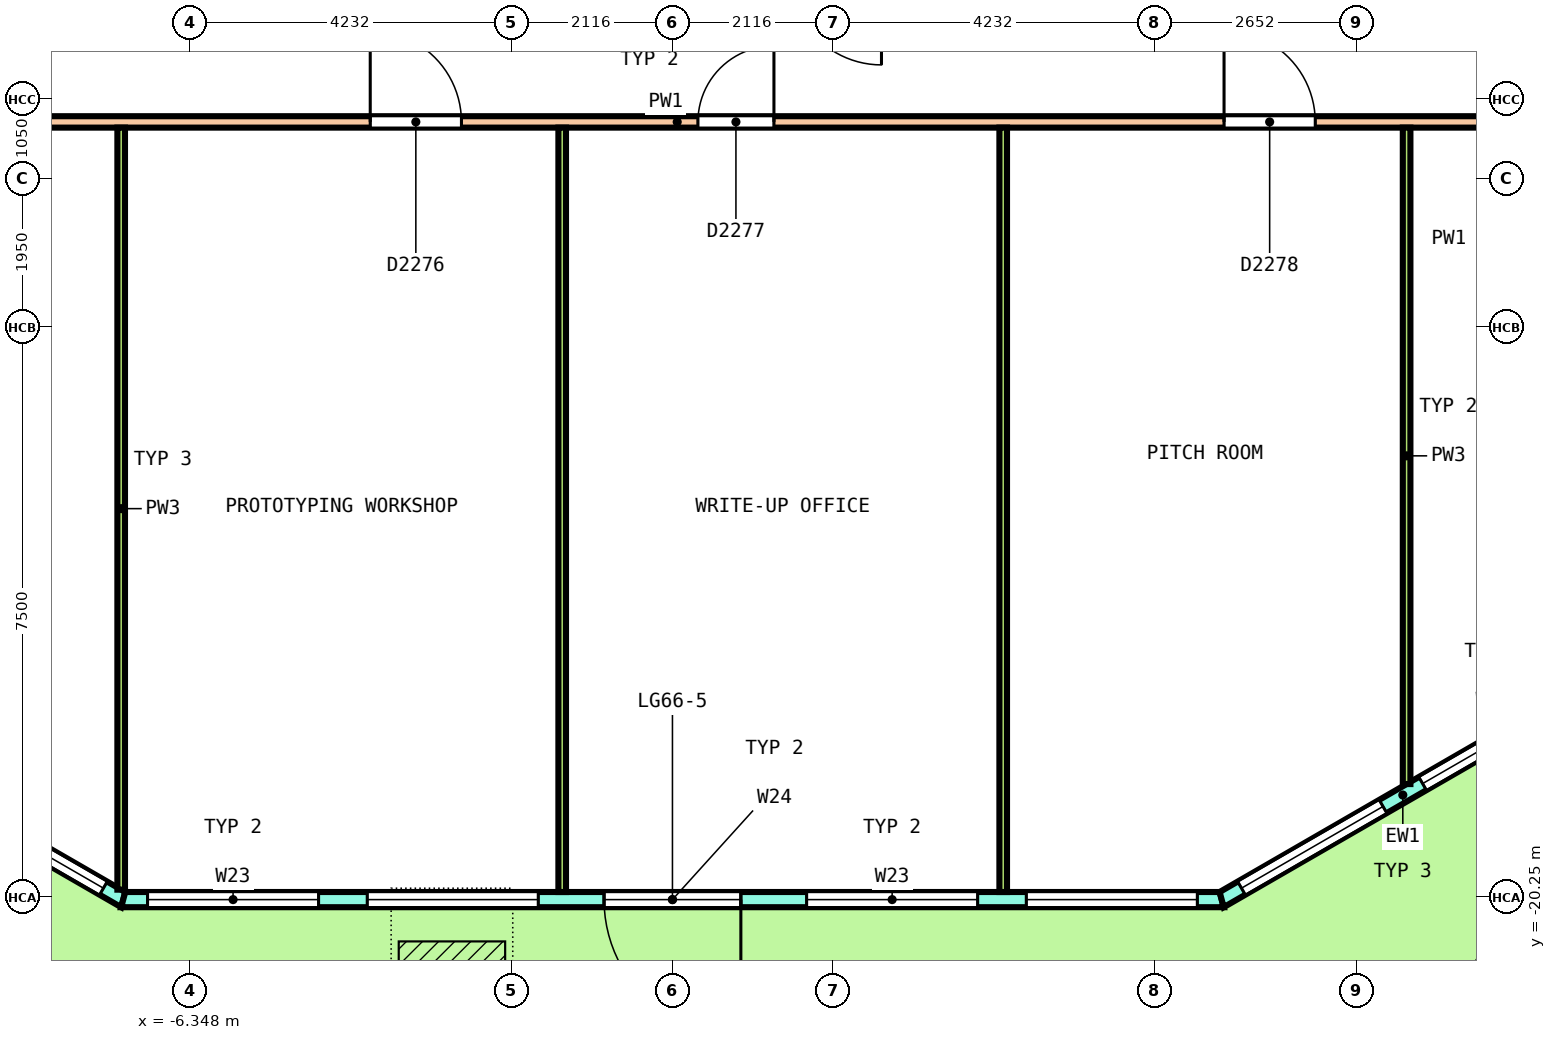
"""IFC4 building model, lengths in metres.
Left out: names, types, materials, properties, quantities, classifications, styles, units other than length and angle.
Written with IfcOpenShell. Run it as: python <this file> out.ifc"""

import sys

from ifc_helpers import new_model, si_unit, direction, frame, frame_2d, origin, origin_2d, place, context, subcontext, project, spatial, polyline, rectangle, outline, extrude, element, fill, save


model = new_model("IFC4")
c1 = context("Model", 3, precision=1e-05, world=origin(), true_north=direction((0.0, 1.0)))
c2 = subcontext(c1, "Body", "Model", "MODEL_VIEW")
j1 = project(units=[si_unit("LENGTHUNIT", "METRE"), si_unit("PLANEANGLEUNIT", "RADIAN")], contexts=[c1])
p1 = place(None, origin())
s1 = spatial("IfcSite", under=j1, at=p1, CompositionType="ELEMENT")
p2 = place(p1, origin())
s2 = spatial("IfcBuilding", under=s1, at=p2, CompositionType="ELEMENT")
p3 = place(p2, frame((0.0, 0.0, 299.0)))
s3 = spatial("IfcBuildingStorey", under=s2, at=p3, CompositionType="ELEMENT", Elevation=299.0)
p4 = place(p3, frame((11.009, -21.33, 0.0), z_axis=(0.155190674447, 0.268873900634, 0.950590700629), x_axis=(0.855754726117, 0.444161245907, -0.265338720059)))
e1 = element("IfcColumn", 1, at=p4, inside=s3, PredefinedType="COLUMN", context=c2, shape_type="SweptSolid", body=[
    extrude(rectangle(XDim=0.95, YDim=0.95, at=origin_2d()), origin(), (0.0, 0.0, 1.0), 3.829),
])
p5 = place(p3, frame((-11.992, -17.53, 0.0), z_axis=(0.0, 0.0, 1.0), x_axis=(0.866026017613, -0.499998936816, 0.0)))
e2 = element("IfcWall", 2, at=p5, inside=s3, PredefinedType="SOLIDWALL", context=c2, shape_type="SweptSolid", body=[
    extrude(outline(polyline([(-0.027, -0.1), (1.084, -0.1), (2.196, -0.1), (3.307, -0.1), (4.419, -0.1), (5.53, -0.1), (5.477, 0.1), (4.387, 0.1), (3.297, 0.1), (2.207, 0.1), (1.117, 0.1), (0.027, 0.1), (-0.027, -0.1)])), origin(), (0.0, 0.0, 1.0), 3.7),
])
p6 = place(p5, frame((0.301, 0.0, 0.1)))
e3 = element("IfcOpeningElement", 3, at=p6, cuts=e2, PredefinedType="OPENING", context=c2, shape_type="SweptSolid", body=[
    extrude(rectangle(XDim=2.15, YDim=2.75, at=frame_2d((1.075, 1.375))), frame((0.0, 0.11, 0.0), z_axis=(0.0, -1.0, 0.0), x_axis=(1.0, 0.0, 0.0)), (0.0, 0.0, 1.0), 0.22),
])
p7 = place(p5, frame((3.052, 0.0, 0.1)))
e4 = element("IfcOpeningElement", 4, at=p7, cuts=e2, PredefinedType="OPENING", context=c2, shape_type="SweptSolid", body=[
    extrude(rectangle(XDim=2.15, YDim=2.75, at=frame_2d((1.075, 1.375))), frame((0.0, 0.11, 0.0), z_axis=(0.0, -1.0, 0.0), x_axis=(1.0, 0.0, 0.0)), (0.0, 0.0, 1.0), 0.22),
])
p8 = place(p3, frame((-7.226, -20.281, 0.0), z_axis=(0.0, 0.0, 1.0), x_axis=(1.0, 0.0, 0.0)))
e5 = element("IfcWall", 5, at=p8, inside=s3, PredefinedType="SOLIDWALL", context=c2, shape_type="SweptSolid", body=[
    extrude(outline(polyline([(-0.027, -0.1), (1.009, -0.1), (2.045, -0.1), (3.081, -0.1), (4.117, -0.1), (5.154, -0.1), (6.189, -0.1), (7.226, -0.1), (8.262, -0.1), (9.298, -0.1), (10.334, -0.1), (11.37, -0.1), (12.406, -0.1), (13.442, -0.1), (14.478, -0.1), (14.424, 0.1), (13.396, 0.1), (12.367, 0.1), (11.339, 0.1), (10.311, 0.1), (9.282, 0.1), (8.254, 0.1), (7.226, 0.1), (6.197, 0.1), (5.169, 0.1), (4.14, 0.1), (3.112, 0.1), (2.084, 0.1), (1.055, 0.1), (0.027, 0.1), (-0.027, -0.1)])), origin(), (0.0, 0.0, 1.0), 3.7),
])
p9 = place(p8, frame((0.32, 0.0, 0.1)))
e6 = element("IfcOpeningElement", 6, at=p9, cuts=e5, PredefinedType="OPENING", context=c2, shape_type="SweptSolid", body=[
    extrude(rectangle(XDim=2.25, YDim=2.75, at=frame_2d((1.125, 1.375))), frame((0.0, 0.11, 0.0), z_axis=(0.0, -1.0, 0.0), x_axis=(1.0, 0.0, 0.0)), (0.0, 0.0, 1.0), 0.22),
])
p10 = place(p8, frame((3.21, 0.0, 0.1)))
e7 = element("IfcOpeningElement", 7, at=p10, cuts=e5, PredefinedType="OPENING", context=c2, shape_type="SweptSolid", body=[
    extrude(rectangle(XDim=2.25, YDim=2.75, at=frame_2d((1.125, 1.375))), frame((0.0, 0.11, 0.0), z_axis=(0.0, -1.0, 0.0), x_axis=(1.0, 0.0, 0.0)), (0.0, 0.0, 1.0), 0.22),
])
p11 = place(p8, frame((6.326, 0.0, 0.0)))
e8 = element("IfcOpeningElement", 8, at=p11, cuts=e5, PredefinedType="OPENING", context=c2, shape_type="SweptSolid", body=[
    extrude(rectangle(XDim=1.8, YDim=2.4, at=frame_2d((0.9, 1.2))), frame((0.0, 0.11, 0.0), z_axis=(0.0, -1.0, 0.0), x_axis=(1.0, 0.0, 0.0)), (0.0, 0.0, 1.0), 0.22),
])
p12 = place(p8, frame((6.326, 0.0, 2.55)))
e9 = element("IfcOpeningElement", 9, at=p12, cuts=e5, PredefinedType="OPENING", context=c2, shape_type="SweptSolid", body=[
    extrude(rectangle(XDim=1.8, YDim=0.3, at=frame_2d((0.9, 0.15))), frame((0.0, 0.11, 0.0), z_axis=(0.0, -1.0, 0.0), x_axis=(1.0, 0.0, 0.0)), (0.0, 0.0, 1.0), 0.22),
])
p13 = place(p8, frame((8.991, 0.0, 0.1)))
e10 = element("IfcOpeningElement", 10, at=p13, cuts=e5, PredefinedType="OPENING", context=c2, shape_type="SweptSolid", body=[
    extrude(rectangle(XDim=2.25, YDim=2.75, at=frame_2d((1.125, 1.375))), frame((0.0, 0.11, 0.0), z_axis=(0.0, -1.0, 0.0), x_axis=(1.0, 0.0, 0.0)), (0.0, 0.0, 1.0), 0.22),
])
p14 = place(p8, frame((11.881, 0.0, 0.1)))
e11 = element("IfcOpeningElement", 11, at=p14, cuts=e5, PredefinedType="OPENING", context=c2, shape_type="SweptSolid", body=[
    extrude(rectangle(XDim=2.25, YDim=2.75, at=frame_2d((1.125, 1.375))), frame((0.0, 0.11, 0.0), z_axis=(0.0, -1.0, 0.0), x_axis=(1.0, 0.0, 0.0)), (0.0, 0.0, 1.0), 0.22),
])
p15 = place(p3, frame((7.226, -20.281, 0.0), z_axis=(0.0, 0.0, 1.0), x_axis=(0.866026017613, 0.499998936816, 0.0)))
e12 = element("IfcWall", 12, at=p15, inside=s3, PredefinedType="SOLIDWALL", context=c2, shape_type="SweptSolid", body=[
    extrude(outline(polyline([(-0.027, -0.1), (1.084, -0.1), (2.196, -0.1), (3.307, -0.1), (4.419, -0.1), (5.53, -0.1), (5.477, 0.1), (4.387, 0.1), (3.297, 0.1), (2.207, 0.1), (1.117, 0.1), (0.027, 0.1), (-0.027, -0.1)])), origin(), (0.0, 0.0, 1.0), 3.7),
])
p16 = place(p15, frame((0.301, 0.0, 0.1)))
e13 = element("IfcOpeningElement", 13, at=p16, cuts=e12, PredefinedType="OPENING", context=c2, shape_type="SweptSolid", body=[
    extrude(rectangle(XDim=2.15, YDim=2.75, at=frame_2d((1.075, 1.375))), frame((0.0, 0.11, 0.0), z_axis=(0.0, -1.0, 0.0), x_axis=(1.0, 0.0, 0.0)), (0.0, 0.0, 1.0), 0.22),
])
p17 = place(p15, frame((3.052, 0.0, 0.1)))
e14 = element("IfcOpeningElement", 14, at=p17, cuts=e12, PredefinedType="OPENING", context=c2, shape_type="SweptSolid", body=[
    extrude(rectangle(XDim=2.15, YDim=2.75, at=frame_2d((1.075, 1.375))), frame((0.0, 0.11, 0.0), z_axis=(0.0, -1.0, 0.0), x_axis=(1.0, 0.0, 0.0)), (0.0, 0.0, 1.0), 0.22),
])
p18 = place(p3, frame((-10.9, -10.05, 0.0), z_axis=(0.0, 0.0, 1.0), x_axis=(1.0, 0.0, 0.0)))
e15 = element("IfcWall", 15, at=p18, inside=s3, PredefinedType="PARTITIONING", context=c2, shape_type="SweptSolid", body=[
    extrude(rectangle(XDim=21.925, YDim=0.15, at=frame_2d((10.962, 0.0))), origin(), (0.0, 0.0, 1.0), 2.9),
])
p19 = place(p18, frame((1.299, 0.0, 0.0)))
e16 = element("IfcOpeningElement", 16, at=p19, cuts=e15, PredefinedType="OPENING", context=c2, shape_type="SweptSolid", body=[
    extrude(rectangle(XDim=1.0, YDim=2.1, at=frame_2d((0.5, 1.05))), frame((0.0, 0.085, 0.0), z_axis=(0.0, -1.0, 0.0), x_axis=(1.0, 0.0, 0.0)), (0.0, 0.0, 1.0), 0.17),
])
p20 = place(p18, frame((6.924, 0.0, 0.0)))
e17 = element("IfcOpeningElement", 17, at=p20, cuts=e15, PredefinedType="OPENING", context=c2, shape_type="SweptSolid", body=[
    extrude(rectangle(XDim=1.2, YDim=2.1, at=frame_2d((0.6, 1.05))), frame((0.0, 0.085, 0.0), z_axis=(0.0, -1.0, 0.0), x_axis=(1.0, 0.0, 0.0)), (0.0, 0.0, 1.0), 0.17),
])
p21 = place(p18, frame((11.235, 0.0, 0.0)))
e18 = element("IfcOpeningElement", 18, at=p21, cuts=e15, PredefinedType="OPENING", context=c2, shape_type="SweptSolid", body=[
    extrude(rectangle(XDim=1.0, YDim=2.1, at=frame_2d((0.5, 1.05))), frame((0.0, 0.085, 0.0), z_axis=(0.0, -1.0, 0.0), x_axis=(1.0, 0.0, 0.0)), (0.0, 0.0, 1.0), 0.17),
])
p22 = place(p18, frame((18.157, 0.0, 0.0)))
e19 = element("IfcOpeningElement", 19, at=p22, cuts=e15, PredefinedType="OPENING", context=c2, shape_type="SweptSolid", body=[
    extrude(rectangle(XDim=1.2, YDim=2.1, at=frame_2d((0.6, 1.05))), frame((0.0, 0.085, 0.0), z_axis=(0.0, -1.0, 0.0), x_axis=(1.0, 0.0, 0.0)), (0.0, 0.0, 1.0), 0.17),
])
p23 = place(p3, frame((-7.252, -20.15, 0.0), z_axis=(0.0, 0.0, 1.0), x_axis=(0.0, 1.0, 0.0)))
e20 = element("IfcWall", 20, at=p23, inside=s3, PredefinedType="PARTITIONING", context=c2, shape_type="SweptSolid", body=[
    extrude(rectangle(XDim=10.025, YDim=0.1, at=frame_2d((5.013, 0.0))), origin(), (0.0, 0.0, 1.0), 2.9),
])
for number, where, z_axis, x_axis in (
    (21, (-1.45, -20.181, 0.0), (0.0, 0.0, 1.0), (0.0, 1.0, 0.0)),
    (22, (4.352, -20.181, 0.0), (0.0, 0.0, 1.0), (0.0, 1.0, 0.0)),
):
    element("IfcWall", number, at=place(p3, frame(where, z_axis=z_axis, x_axis=x_axis)), inside=s3, PredefinedType="PARTITIONING", context=c2, shape_type="SweptSolid", body=[
        extrude(rectangle(XDim=10.056, YDim=0.1, at=frame_2d((5.028, 0.0))), origin(), (0.0, 0.0, 1.0), 2.9),
    ])
p24 = place(p3, frame((9.659, -18.761, 0.0), z_axis=(0.0, 0.0, 1.0), x_axis=(0.0, 1.0, 0.0)))
e23 = element("IfcWall", 23, at=p24, inside=s3, PredefinedType="PARTITIONING", context=c2, shape_type="SweptSolid", body=[
    extrude(rectangle(XDim=8.636, YDim=0.1, at=frame_2d((4.318, 0.0))), origin(), (0.0, 0.0, 1.0), 2.9),
])
p25 = place(p7, origin())
e24 = element("IfcWindow", 24, at=p25, inside=s3, PartitioningType="SINGLE_PANEL", PredefinedType="WINDOW", context=c2, shape_type="SweptSolid", body=[
    extrude(rectangle(XDim=2.15, YDim=2.75, at=frame_2d((1.075, 1.375))), frame((0.0, 0.03, 0.0), z_axis=(0.0, -1.0, 0.0), x_axis=(1.0, 0.0, 0.0)), (0.0, 0.0, 1.0), 0.06),
])
fill(e4, e24)
p26 = place(p9, origin())
e25 = element("IfcWindow", 25, at=p26, inside=s3, PartitioningType="SINGLE_PANEL", PredefinedType="WINDOW", context=c2, shape_type="SweptSolid", body=[
    extrude(rectangle(XDim=2.25, YDim=2.75, at=frame_2d((1.125, 1.375))), frame((0.0, 0.03, 0.0), z_axis=(0.0, -1.0, 0.0), x_axis=(1.0, 0.0, 0.0)), (0.0, 0.0, 1.0), 0.06),
])
fill(e6, e25)
p27 = place(p10, origin())
e26 = element("IfcWindow", 26, at=p27, inside=s3, PartitioningType="SINGLE_PANEL", PredefinedType="WINDOW", context=c2, shape_type="SweptSolid", body=[
    extrude(rectangle(XDim=2.25, YDim=2.75, at=frame_2d((1.125, 1.375))), frame((0.0, 0.03, 0.0), z_axis=(0.0, -1.0, 0.0), x_axis=(1.0, 0.0, 0.0)), (0.0, 0.0, 1.0), 0.06),
])
fill(e7, e26)
p28 = place(p11, origin())
e27 = element("IfcDoor", 27, at=p28, inside=s3, OperationType="DOUBLE_DOOR_SINGLE_SWING", PredefinedType="DOOR", context=c2, shape_type="SweptSolid", body=[
    extrude(rectangle(XDim=1.8, YDim=2.4, at=frame_2d((0.9, 1.2))), frame((0.0, 0.025, 0.0), z_axis=(0.0, -1.0, 0.0), x_axis=(1.0, 0.0, 0.0)), (0.0, 0.0, 1.0), 0.05),
])
fill(e8, e27)
p29 = place(p12, origin())
e28 = element("IfcWindow", 28, at=p29, inside=s3, PartitioningType="SINGLE_PANEL", PredefinedType="WINDOW", context=c2, shape_type="SweptSolid", body=[
    extrude(rectangle(XDim=1.8, YDim=0.3, at=frame_2d((0.9, 0.15))), frame((0.0, 0.03, 0.0), z_axis=(0.0, -1.0, 0.0), x_axis=(1.0, 0.0, 0.0)), (0.0, 0.0, 1.0), 0.06),
])
fill(e9, e28)
p30 = place(p13, origin())
e29 = element("IfcWindow", 29, at=p30, inside=s3, PartitioningType="SINGLE_PANEL", PredefinedType="WINDOW", context=c2, shape_type="SweptSolid", body=[
    extrude(rectangle(XDim=2.25, YDim=2.75, at=frame_2d((1.125, 1.375))), frame((0.0, 0.03, 0.0), z_axis=(0.0, -1.0, 0.0), x_axis=(1.0, 0.0, 0.0)), (0.0, 0.0, 1.0), 0.06),
])
fill(e10, e29)
p31 = place(p14, origin())
e30 = element("IfcWindow", 30, at=p31, inside=s3, PartitioningType="SINGLE_PANEL", PredefinedType="WINDOW", context=c2, shape_type="SweptSolid", body=[
    extrude(rectangle(XDim=2.25, YDim=2.75, at=frame_2d((1.125, 1.375))), frame((0.0, 0.03, 0.0), z_axis=(0.0, -1.0, 0.0), x_axis=(1.0, 0.0, 0.0)), (0.0, 0.0, 1.0), 0.06),
])
fill(e11, e30)
p32 = place(p16, origin())
e31 = element("IfcWindow", 31, at=p32, inside=s3, PartitioningType="SINGLE_PANEL", PredefinedType="WINDOW", context=c2, shape_type="SweptSolid", body=[
    extrude(rectangle(XDim=2.15, YDim=2.75, at=frame_2d((1.075, 1.375))), frame((0.0, 0.03, 0.0), z_axis=(0.0, -1.0, 0.0), x_axis=(1.0, 0.0, 0.0)), (0.0, 0.0, 1.0), 0.06),
])
fill(e13, e31)
p33 = place(p17, origin())
e32 = element("IfcWindow", 32, at=p33, inside=s3, PartitioningType="SINGLE_PANEL", PredefinedType="WINDOW", context=c2, shape_type="SweptSolid", body=[
    extrude(rectangle(XDim=2.15, YDim=2.75, at=frame_2d((1.075, 1.375))), frame((0.0, 0.03, 0.0), z_axis=(0.0, -1.0, 0.0), x_axis=(1.0, 0.0, 0.0)), (0.0, 0.0, 1.0), 0.06),
])
fill(e14, e32)
p34 = place(p20, origin())
e33 = element("IfcDoor", 33, at=p34, inside=s3, OperationType="DOUBLE_DOOR_SINGLE_SWING", PredefinedType="DOOR", context=c2, shape_type="SweptSolid", body=[
    extrude(rectangle(XDim=1.2, YDim=2.1, at=frame_2d((0.6, 1.05))), frame((0.0, 0.025, 0.0), z_axis=(0.0, -1.0, 0.0), x_axis=(1.0, 0.0, 0.0)), (0.0, 0.0, 1.0), 0.05),
])
fill(e17, e33)
p35 = place(p21, origin())
e34 = element("IfcDoor", 34, at=p35, inside=s3, OperationType="SINGLE_SWING_RIGHT", PredefinedType="DOOR", context=c2, shape_type="SweptSolid", body=[
    extrude(rectangle(XDim=1.0, YDim=2.1, at=frame_2d((0.5, 1.05))), frame((0.0, 0.025, 0.0), z_axis=(0.0, -1.0, 0.0), x_axis=(1.0, 0.0, 0.0)), (0.0, 0.0, 1.0), 0.05),
])
fill(e18, e34)
p36 = place(p22, origin())
e35 = element("IfcDoor", 35, at=p36, inside=s3, OperationType="DOUBLE_DOOR_SINGLE_SWING", PredefinedType="DOOR", context=c2, shape_type="SweptSolid", body=[
    extrude(rectangle(XDim=1.2, YDim=2.1, at=frame_2d((0.6, 1.05))), frame((0.0, 0.025, 0.0), z_axis=(0.0, -1.0, 0.0), x_axis=(1.0, 0.0, 0.0)), (0.0, 0.0, 1.0), 0.05),
])
fill(e19, e35)
save(model, sys.argv[1])
